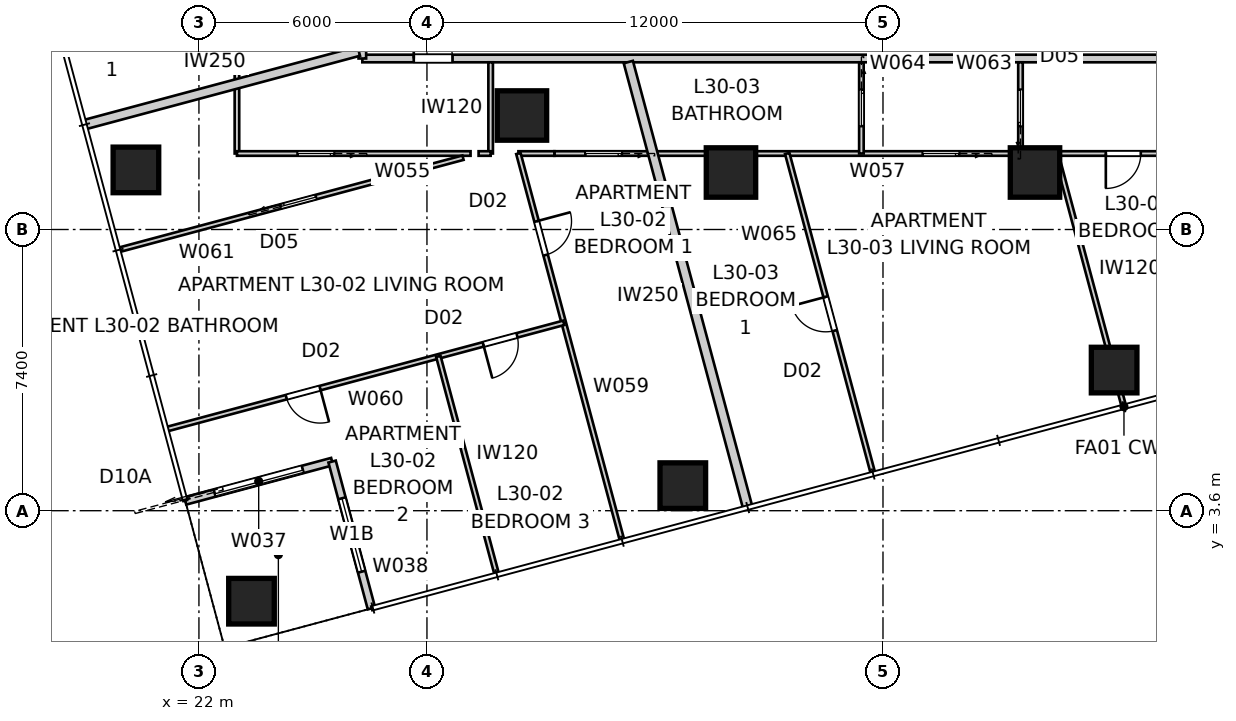
"""IFC4 building model, lengths in metres.
Left out: names, types, materials, properties, quantities, classifications, styles, units other than length and angle.
Written with IfcOpenShell. Run it as: python <this file> out.ifc"""

import sys

from ifc_helpers import new_model, si_unit, direction, frame, frame_2d, origin, origin_2d, place, context, subcontext, project, spatial, rectangle, extrude, element, fill, save


model = new_model("IFC4")
c1 = context("Model", 3, precision=1e-05, world=origin(), true_north=direction((0.0, 1.0)))
c2 = subcontext(c1, "Body", "Model", "MODEL_VIEW")
j1 = project(units=[si_unit("LENGTHUNIT", "METRE"), si_unit("PLANEANGLEUNIT", "RADIAN")], contexts=[c1])
p1 = place(None, origin())
s1 = spatial("IfcSite", under=j1, at=p1, CompositionType="ELEMENT")
p2 = place(p1, origin())
s2 = spatial("IfcBuilding", under=s1, at=p2, CompositionType="ELEMENT")
p3 = place(p2, frame((0.0, 0.0, 111.6)))
s3 = spatial("IfcBuildingStorey", under=s2, at=p3, CompositionType="ELEMENT", Elevation=111.6)
for number, where, z_axis, x_axis in (
    (1, (23.383, 1.219, -0.15), (0.0, 0.0, 1.0), (1.0, 0.0, 0.0)),
    (2, (34.733, 4.26, -0.15), (0.0, 0.0, 1.0), (1.0, 0.0, 0.0)),
    (3, (46.082, 7.301, -0.15), (0.0, 0.0, 1.0), (1.0, 0.0, 0.0)),
    (4, (20.342, 12.568, -0.15), (0.0, 0.0, 1.0), (1.0, 0.0, 0.0)),
):
    element("IfcColumn", number, at=place(p3, frame(where, z_axis=z_axis, x_axis=x_axis)), inside=s3, PredefinedType="COLUMN", context=c2, shape_type="SweptSolid", body=[
        extrude(rectangle(XDim=1.2, YDim=1.2, at=origin_2d()), origin(), (0.0, 0.0, 1.0), 3.55),
    ])
for number, where, z_axis, x_axis in (
    (5, (30.5, 14.0, 0.0), (0.0, 0.0, 1.0), (1.0, 0.0, 0.0)),
    (6, (36.0, 12.5, 0.0), (0.0, 0.0, 1.0), (1.0, 0.0, 0.0)),
    (7, (44.0, 12.5, 0.0), (0.0, 0.0, 1.0), (1.0, 0.0, 0.0)),
):
    element("IfcColumn", number, at=place(p3, frame(where, z_axis=z_axis, x_axis=x_axis)), inside=s3, PredefinedType="COLUMN", context=c2, shape_type="SweptSolid", body=[
        extrude(rectangle(XDim=1.3, YDim=1.3, at=origin_2d()), origin(), (0.0, 0.0, 1.0), 3.4),
    ])
p4 = place(p3, frame((21.641, 3.857, 0.0), z_axis=(0.0, 0.0, 1.0), x_axis=(0.965919172068, 0.258843877716, 0.0)))
e8 = element("IfcWall", 8, at=p4, inside=s3, PredefinedType="SOLIDWALL", context=c2, shape_type="SweptSolid", body=[
    extrude(rectangle(XDim=4.0, YDim=0.2, at=frame_2d((2.0, 0.0))), origin(), (0.0, 0.0, 1.0), 3.25),
])
p5 = place(p4, frame((0.8, 0.0, 0.0)))
e9 = element("IfcOpeningElement", 9, at=p5, cuts=e8, PredefinedType="OPENING", context=c2, shape_type="SweptSolid", body=[
    extrude(rectangle(XDim=2.4, YDim=2.1, at=frame_2d((1.2, 1.05))), frame((0.0, 0.11, 0.0), z_axis=(0.0, -1.0, 0.0), x_axis=(1.0, 0.0, 0.0)), (0.0, 0.0, 1.0), 0.22),
])
p6 = place(p3, frame((25.504, 4.893, 0.0), z_axis=(0.0, 0.0, 1.0), x_axis=(0.258786931944, -0.965934430412, 0.0)))
e10 = element("IfcWall", 10, at=p6, inside=s3, PredefinedType="SOLIDWALL", context=c2, shape_type="SweptSolid", body=[
    extrude(rectangle(XDim=4.0, YDim=0.2, at=frame_2d((2.0, 0.0))), origin(), (0.0, 0.0, 1.0), 3.25),
])
p7 = place(p6, frame((1.0, 0.0, 0.45)))
e11 = element("IfcOpeningElement", 11, at=p7, cuts=e10, PredefinedType="OPENING", context=c2, shape_type="SweptSolid", body=[
    extrude(rectangle(XDim=2.0, YDim=1.8, at=frame_2d((1.0, 0.9))), frame((0.0, 0.11, 0.0), z_axis=(0.0, -1.0, 0.0), x_axis=(1.0, 0.0, 0.0)), (0.0, 0.0, 1.0), 0.22),
])
p8 = place(p3, frame((26.3, 15.5, 0.0), z_axis=(0.0, 0.0, 1.0), x_axis=(1.0, 0.0, 0.0)))
e12 = element("IfcWall", 12, at=p8, inside=s3, PredefinedType="PARTITIONING", context=c2, shape_type="SweptSolid", body=[
    extrude(rectangle(XDim=28.2, YDim=0.2, at=frame_2d((14.1, 0.0))), origin(), (0.0, 0.0, 1.0), 3.25),
])
p9 = place(p8, frame((21.474, 0.0, 0.0)))
e13 = element("IfcOpeningElement", 13, at=p9, cuts=e12, PredefinedType="OPENING", context=c2, shape_type="SweptSolid", body=[
    extrude(rectangle(XDim=1.02, YDim=2.34, at=frame_2d((0.51, 1.17))), frame((0.0, 0.11, 0.0), z_axis=(0.0, -1.0, 0.0), x_axis=(1.0, 0.0, 0.0)), (0.0, 0.0, 1.0), 0.22),
])
p10 = place(p8, frame((1.353, 0.0, 0.0)))
e14 = element("IfcOpeningElement", 14, at=p10, cuts=e12, PredefinedType="OPENING", context=c2, shape_type="SweptSolid", body=[
    extrude(rectangle(XDim=1.02, YDim=2.1, at=frame_2d((0.51, 1.05))), frame((0.0, 0.11, 0.0), z_axis=(0.0, -1.0, 0.0), x_axis=(1.0, 0.0, 0.0)), (0.0, 0.0, 1.0), 0.22),
])
p11 = place(p3, frame((26.3, 42.52, 0.0), z_axis=(0.0, 0.0, 1.0), x_axis=(0.0, -1.0, 0.0)))
e15 = element("IfcWall", 15, at=p11, inside=s3, PredefinedType="PARTITIONING", context=c2, shape_type="SweptSolid", body=[
    extrude(rectangle(XDim=27.02, YDim=0.2, at=frame_2d((13.51, 0.0))), origin(), (0.0, 0.0, 1.0), 3.25),
])
p12 = place(p11, frame((23.584, 0.0, 0.0)))
e16 = element("IfcOpeningElement", 16, at=p12, cuts=e15, PredefinedType="OPENING", context=c2, shape_type="SweptSolid", body=[
    extrude(rectangle(XDim=1.02, YDim=2.1, at=frame_2d((0.51, 1.05))), frame((0.0, 0.11, 0.0), z_axis=(0.0, -1.0, 0.0), x_axis=(1.0, 0.0, 0.0)), (0.0, 0.0, 1.0), 0.22),
])
p13 = place(p11, frame((13.468, 0.0, 0.0)))
e17 = element("IfcOpeningElement", 17, at=p13, cuts=e15, PredefinedType="OPENING", context=c2, shape_type="SweptSolid", body=[
    extrude(rectangle(XDim=1.02, YDim=2.34, at=frame_2d((0.51, 1.17))), frame((0.0, 0.11, 0.0), z_axis=(0.0, -1.0, 0.0), x_axis=(1.0, 0.0, 0.0)), (0.0, 0.0, 1.0), 0.22),
])
p14 = place(p3, frame((36.44, 3.682, 0.0), z_axis=(0.0, 0.0, 1.0), x_axis=(-0.258824223352, 0.965924438766, 0.0)))
e18 = element("IfcWall", 18, at=p14, inside=s3, PredefinedType="PARTITIONING", context=c2, shape_type="SweptSolid", body=[
    extrude(rectangle(XDim=12.138, YDim=0.25, at=frame_2d((6.069, 0.0))), origin(), (0.0, 0.0, 1.0), 3.25),
])
p15 = place(p3, frame((18.988, 13.758, 0.0), z_axis=(0.0, 0.0, 1.0), x_axis=(0.965929532284, 0.258805213744, 0.0)))
e19 = element("IfcWall", 19, at=p15, inside=s3, PredefinedType="PARTITIONING", context=c2, shape_type="SweptSolid", body=[
    extrude(rectangle(XDim=7.473, YDim=0.25, at=frame_2d((3.737, 0.0))), origin(), (0.0, 0.0, 1.0), 3.25),
])
p16 = place(p3, frame((23.0, 13.0, 0.0), z_axis=(0.0, 0.0, 1.0), x_axis=(0.0, 1.0, 0.0)))
e20 = element("IfcWall", 20, at=p16, inside=s3, PredefinedType="PARTITIONING", context=c2, shape_type="SweptSolid", body=[
    extrude(rectangle(XDim=27.64, YDim=0.12, at=frame_2d((13.82, 0.0))), origin(), (0.0, 0.0, 1.0), 2.55),
])
p17 = place(p16, frame((3.192, 0.0, 0.0)))
e21 = element("IfcOpeningElement", 21, at=p17, cuts=e20, PredefinedType="OPENING", context=c2, shape_type="SweptSolid", body=[
    extrude(rectangle(XDim=0.92, YDim=2.34, at=frame_2d((0.46, 1.17))), frame((0.0, 0.07, 0.0), z_axis=(0.0, -1.0, 0.0), x_axis=(1.0, 0.0, 0.0)), (0.0, 0.0, 1.0), 0.14),
])
p18 = place(p16, frame((13.779, 0.0, 0.0)))
e22 = element("IfcOpeningElement", 22, at=p18, cuts=e20, PredefinedType="OPENING", context=c2, shape_type="SweptSolid", body=[
    extrude(rectangle(XDim=0.92, YDim=2.34, at=frame_2d((0.46, 1.17))), frame((0.0, 0.07, 0.0), z_axis=(0.0, -1.0, 0.0), x_axis=(1.0, 0.0, 0.0)), (0.0, 0.0, 1.0), 0.14),
])
p19 = place(p16, frame((16.374, 0.0, 0.0)))
e23 = element("IfcOpeningElement", 23, at=p19, cuts=e20, PredefinedType="OPENING", context=c2, shape_type="SweptSolid", body=[
    extrude(rectangle(XDim=0.92, YDim=2.34, at=frame_2d((0.46, 1.17))), frame((0.0, 0.07, 0.0), z_axis=(0.0, -1.0, 0.0), x_axis=(1.0, 0.0, 0.0)), (0.0, 0.0, 1.0), 0.14),
])
p20 = place(p16, frame((9.743, 0.0, 0.0)))
e24 = element("IfcOpeningElement", 24, at=p20, cuts=e20, PredefinedType="OPENING", context=c2, shape_type="SweptSolid", body=[
    extrude(rectangle(XDim=0.96, YDim=2.1, at=frame_2d((0.48, 1.05))), frame((0.0, 0.07, 0.0), z_axis=(0.0, -1.0, 0.0), x_axis=(1.0, 0.0, 0.0)), (0.0, 0.0, 1.0), 0.14),
])
p21 = place(p16, frame((24.879, 0.0, 0.0)))
e25 = element("IfcOpeningElement", 25, at=p21, cuts=e20, PredefinedType="OPENING", context=c2, shape_type="SweptSolid", body=[
    extrude(rectangle(XDim=0.96, YDim=2.1, at=frame_2d((0.48, 1.05))), frame((0.0, 0.07, 0.0), z_axis=(0.0, -1.0, 0.0), x_axis=(1.0, 0.0, 0.0)), (0.0, 0.0, 1.0), 0.14),
])
p22 = place(p3, frame((29.676, 15.4, 0.0), z_axis=(0.0, 0.0, 1.0), x_axis=(0.0, -1.0, 0.0)))
e26 = element("IfcWall", 26, at=p22, inside=s3, PredefinedType="PARTITIONING", context=c2, shape_type="SweptSolid", body=[
    extrude(rectangle(XDim=2.4, YDim=0.12, at=frame_2d((1.2, 0.0))), origin(), (0.0, 0.0, 1.0), 3.25),
])
p23 = place(p3, frame((29.147, 13.0, 0.0), z_axis=(0.0, 0.0, 1.0), x_axis=(-1.0, 0.0, 0.0)))
e27 = element("IfcWall", 27, at=p23, inside=s3, PredefinedType="PARTITIONING", context=c2, shape_type="SweptSolid", body=[
    extrude(rectangle(XDim=6.147, YDim=0.12, at=frame_2d((3.074, 0.0))), origin(), (0.0, 0.0, 1.0), 3.25),
])
p24 = place(p23, frame((3.591, 0.0, 0.0)))
e28 = element("IfcOpeningElement", 28, at=p24, cuts=e27, PredefinedType="OPENING", context=c2, shape_type="SweptSolid", body=[
    extrude(rectangle(XDim=0.96, YDim=2.1, at=frame_2d((0.48, 1.05))), frame((0.0, 0.07, 0.0), z_axis=(0.0, -1.0, 0.0), x_axis=(1.0, 0.0, 0.0)), (0.0, 0.0, 1.0), 0.14),
])
p25 = place(p3, frame((55.046, 13.0, 0.0), z_axis=(0.0, 0.0, 1.0), x_axis=(-1.0, 0.0, 0.0)))
e29 = element("IfcWall", 29, at=p25, inside=s3, PredefinedType="PARTITIONING", context=c2, shape_type="SweptSolid", body=[
    extrude(rectangle(XDim=23.693, YDim=0.12, at=frame_2d((11.846, 0.0))), origin(), (0.0, 0.0, 1.0), 2.55),
])
p26 = place(p25, frame((8.262, 0.0, 0.0)))
e30 = element("IfcOpeningElement", 30, at=p26, cuts=e29, PredefinedType="OPENING", context=c2, shape_type="SweptSolid", body=[
    extrude(rectangle(XDim=0.92, YDim=2.34, at=frame_2d((0.46, 1.17))), frame((0.0, 0.07, 0.0), z_axis=(0.0, -1.0, 0.0), x_axis=(1.0, 0.0, 0.0)), (0.0, 0.0, 1.0), 0.14),
])
p27 = place(p25, frame((3.825, 0.0, 0.0)))
e31 = element("IfcOpeningElement", 31, at=p27, cuts=e29, PredefinedType="OPENING", context=c2, shape_type="SweptSolid", body=[
    extrude(rectangle(XDim=0.92, YDim=2.34, at=frame_2d((0.46, 1.17))), frame((0.0, 0.07, 0.0), z_axis=(0.0, -1.0, 0.0), x_axis=(1.0, 0.0, 0.0)), (0.0, 0.0, 1.0), 0.14),
])
p28 = place(p25, frame((1.274, 0.0, 0.0)))
e32 = element("IfcOpeningElement", 32, at=p28, cuts=e29, PredefinedType="OPENING", context=c2, shape_type="SweptSolid", body=[
    extrude(rectangle(XDim=0.92, YDim=2.34, at=frame_2d((0.46, 1.17))), frame((0.0, 0.07, 0.0), z_axis=(0.0, -1.0, 0.0), x_axis=(1.0, 0.0, 0.0)), (0.0, 0.0, 1.0), 0.14),
])
p29 = place(p25, frame((13.041, 0.0, 0.0)))
e33 = element("IfcOpeningElement", 33, at=p29, cuts=e29, PredefinedType="OPENING", context=c2, shape_type="SweptSolid", body=[
    extrude(rectangle(XDim=0.96, YDim=2.1, at=frame_2d((0.48, 1.05))), frame((0.0, 0.07, 0.0), z_axis=(0.0, -1.0, 0.0), x_axis=(1.0, 0.0, 0.0)), (0.0, 0.0, 1.0), 0.14),
])
p30 = place(p25, frame((21.917, 0.0, 0.0)))
e34 = element("IfcOpeningElement", 34, at=p30, cuts=e29, PredefinedType="OPENING", context=c2, shape_type="SweptSolid", body=[
    extrude(rectangle(XDim=0.96, YDim=2.1, at=frame_2d((0.48, 1.05))), frame((0.0, 0.07, 0.0), z_axis=(0.0, -1.0, 0.0), x_axis=(1.0, 0.0, 0.0)), (0.0, 0.0, 1.0), 0.14),
])
p31 = place(p3, frame((30.406, 13.0, 0.0), z_axis=(0.0, 0.0, 1.0), x_axis=(0.258797552287, -0.965931585015, 0.0)))
e35 = element("IfcWall", 35, at=p31, inside=s3, PredefinedType="PARTITIONING", context=c2, shape_type="SweptSolid", body=[
    extrude(rectangle(XDim=10.522, YDim=0.12, at=frame_2d((5.261, 0.0))), origin(), (0.0, 0.0, 1.0), 2.722),
])
p32 = place(p31, frame((1.846, 0.0, 0.0)))
e36 = element("IfcOpeningElement", 36, at=p32, cuts=e35, PredefinedType="OPENING", context=c2, shape_type="SweptSolid", body=[
    extrude(rectangle(XDim=0.92, YDim=2.34, at=frame_2d((0.46, 1.17))), frame((0.0, 0.07, 0.0), z_axis=(0.0, -1.0, 0.0), x_axis=(1.0, 0.0, 0.0)), (0.0, 0.0, 1.0), 0.14),
])
p33 = place(p3, frame((31.6, 8.544, 0.0), z_axis=(0.0, 0.0, 1.0), x_axis=(-0.965927151587, -0.258814098973, 0.0)))
e37 = element("IfcWall", 37, at=p33, inside=s3, PredefinedType="PARTITIONING", context=c2, shape_type="SweptSolid", body=[
    extrude(rectangle(XDim=10.793, YDim=0.12, at=frame_2d((5.396, 0.0))), origin(), (0.0, 0.0, 1.0), 3.25),
])
p34 = place(p33, frame((6.64, 0.0, 0.0)))
e38 = element("IfcOpeningElement", 38, at=p34, cuts=e37, PredefinedType="OPENING", context=c2, shape_type="SweptSolid", body=[
    extrude(rectangle(XDim=0.92, YDim=2.34, at=frame_2d((0.46, 1.17))), frame((0.0, 0.07, 0.0), z_axis=(0.0, -1.0, 0.0), x_axis=(1.0, 0.0, 0.0)), (0.0, 0.0, 1.0), 0.14),
])
p35 = place(p33, frame((1.273, 0.0, 0.0)))
e39 = element("IfcOpeningElement", 39, at=p35, cuts=e37, PredefinedType="OPENING", context=c2, shape_type="SweptSolid", body=[
    extrude(rectangle(XDim=0.92, YDim=2.34, at=frame_2d((0.46, 1.17))), frame((0.0, 0.07, 0.0), z_axis=(0.0, -1.0, 0.0), x_axis=(1.0, 0.0, 0.0)), (0.0, 0.0, 1.0), 0.14),
])
p36 = place(p3, frame((19.911, 10.468, 0.0), z_axis=(0.0, 0.0, 1.0), x_axis=(0.965927203676, 0.25881390457, 0.0)))
e40 = element("IfcWall", 40, at=p36, inside=s3, PredefinedType="PARTITIONING", context=c2, shape_type="SweptSolid", body=[
    extrude(rectangle(XDim=9.357, YDim=0.12, at=frame_2d((4.678, 0.0))), origin(), (0.0, 0.0, 1.0), 2.638),
])
p37 = place(p36, frame((4.391, 0.0, 0.0)))
e41 = element("IfcOpeningElement", 41, at=p37, cuts=e40, PredefinedType="OPENING", context=c2, shape_type="SweptSolid", body=[
    extrude(rectangle(XDim=0.96, YDim=2.1, at=frame_2d((0.48, 1.05))), frame((0.0, 0.07, 0.0), z_axis=(0.0, -1.0, 0.0), x_axis=(1.0, 0.0, 0.0)), (0.0, 0.0, 1.0), 0.14),
])
p38 = place(p3, frame((28.3, 7.66, 0.0), z_axis=(0.0, 0.0, 1.0), x_axis=(0.25882212607, -0.965925000741, 0.0)))
e42 = element("IfcWall", 42, at=p38, inside=s3, PredefinedType="PARTITIONING", context=c2, shape_type="SweptSolid", body=[
    extrude(rectangle(XDim=5.91, YDim=0.12, at=frame_2d((2.955, 0.0))), origin(), (0.0, 0.0, 1.0), 3.25),
])
p39 = place(p3, frame((43.618, 13.0, 0.0), z_axis=(0.0, 0.0, 1.0), x_axis=(0.0, 1.0, 0.0)))
e43 = element("IfcWall", 43, at=p39, inside=s3, PredefinedType="PARTITIONING", context=c2, shape_type="SweptSolid", body=[
    extrude(rectangle(XDim=2.4, YDim=0.12, at=frame_2d((1.2, 0.0))), origin(), (0.0, 0.0, 1.0), 3.25),
])
p40 = place(p39, frame((0.72, 0.0, 0.0)))
e44 = element("IfcOpeningElement", 44, at=p40, cuts=e43, PredefinedType="OPENING", context=c2, shape_type="SweptSolid", body=[
    extrude(rectangle(XDim=0.96, YDim=2.1, at=frame_2d((0.48, 1.05))), frame((0.0, 0.07, 0.0), z_axis=(0.0, -1.0, 0.0), x_axis=(1.0, 0.0, 0.0)), (0.0, 0.0, 1.0), 0.14),
])
p41 = place(p3, frame((39.432, 15.4, 0.0), z_axis=(0.0, 0.0, 1.0), x_axis=(0.0, -1.0, 0.0)))
e45 = element("IfcWall", 45, at=p41, inside=s3, PredefinedType="PARTITIONING", context=c2, shape_type="SweptSolid", body=[
    extrude(rectangle(XDim=2.4, YDim=0.12, at=frame_2d((1.2, 0.0))), origin(), (0.0, 0.0, 1.0), 3.25),
])
p42 = place(p41, frame((0.72, 0.0, 0.0)))
e46 = element("IfcOpeningElement", 46, at=p42, cuts=e45, PredefinedType="OPENING", context=c2, shape_type="SweptSolid", body=[
    extrude(rectangle(XDim=0.96, YDim=2.1, at=frame_2d((0.48, 1.05))), frame((0.0, 0.07, 0.0), z_axis=(0.0, -1.0, 0.0), x_axis=(1.0, 0.0, 0.0)), (0.0, 0.0, 1.0), 0.14),
])
p43 = place(p3, frame((39.73, 4.605, 0.0), z_axis=(0.0, 0.0, 1.0), x_axis=(-0.258819860698, 0.965925607751, 0.0)))
e47 = element("IfcWall", 47, at=p43, inside=s3, PredefinedType="PARTITIONING", context=c2, shape_type="SweptSolid", body=[
    extrude(rectangle(XDim=8.691, YDim=0.12, at=frame_2d((4.346, 0.0))), origin(), (0.0, 0.0, 1.0), 3.25),
])
p44 = place(p43, frame((3.866, 0.0, 0.0)))
e48 = element("IfcOpeningElement", 48, at=p44, cuts=e47, PredefinedType="OPENING", context=c2, shape_type="SweptSolid", body=[
    extrude(rectangle(XDim=0.92, YDim=2.34, at=frame_2d((0.46, 1.17))), frame((0.0, 0.07, 0.0), z_axis=(0.0, -1.0, 0.0), x_axis=(1.0, 0.0, 0.0)), (0.0, 0.0, 1.0), 0.14),
])
p45 = place(p3, frame((44.555, 13.0, 0.0), z_axis=(0.0, 0.0, 1.0), x_axis=(0.258829770556, -0.965922952349, 0.0)))
e49 = element("IfcWall", 49, at=p45, inside=s3, PredefinedType="PARTITIONING", context=c2, shape_type="SweptSolid", body=[
    extrude(rectangle(XDim=6.86, YDim=0.12, at=frame_2d((3.43, 0.0))), origin(), (0.0, 0.0, 1.0), 3.25),
])
p46 = place(p3, frame((29.676, 13.0, 0.0), z_axis=(0.0, 0.0, 1.0), x_axis=(-1.0, 0.0, 0.0)))
e50 = element("IfcWall", 50, at=p46, inside=s3, PredefinedType="PARTITIONING", context=c2, shape_type="SweptSolid", body=[
    extrude(rectangle(XDim=0.317, YDim=0.12, at=frame_2d((0.158, 0.0))), origin(), (0.0, 0.0, 1.0), 3.25),
])
p47 = place(p3, frame((31.354, 13.0, 0.0), z_axis=(0.0, 0.0, 1.0), x_axis=(-1.0, 0.0, 0.0)))
e51 = element("IfcWall", 51, at=p47, inside=s3, PredefinedType="PARTITIONING", context=c2, shape_type="SweptSolid", body=[
    extrude(rectangle(XDim=0.947, YDim=0.12, at=frame_2d((0.474, 0.0))), origin(), (0.0, 0.0, 1.0), 3.25),
])
p48 = place(p5, origin())
e52 = element("IfcDoor", 52, at=p48, inside=s3, OperationType="SLIDING_TO_LEFT", PredefinedType="DOOR", context=c2, shape_type="SweptSolid", body=[
    extrude(rectangle(XDim=2.4, YDim=2.1, at=frame_2d((1.2, 1.05))), frame((0.0, 0.025, 0.0), z_axis=(0.0, -1.0, 0.0), x_axis=(1.0, 0.0, 0.0)), (0.0, 0.0, 1.0), 0.05),
])
fill(e9, e52)
p49 = place(p7, origin())
e53 = element("IfcWindow", 53, at=p49, inside=s3, PartitioningType="SINGLE_PANEL", PredefinedType="WINDOW", context=c2, shape_type="SweptSolid", body=[
    extrude(rectangle(XDim=2.0, YDim=1.8, at=frame_2d((1.0, 0.9))), frame((0.0, 0.03, 0.0), z_axis=(0.0, -1.0, 0.0), x_axis=(1.0, 0.0, 0.0)), (0.0, 0.0, 1.0), 0.06),
])
fill(e11, e53)
p50 = place(p10, origin())
e54 = element("IfcDoor", 54, at=p50, inside=s3, OperationType="SINGLE_SWING_LEFT", PredefinedType="DOOR", context=c2, shape_type="SweptSolid", body=[
    extrude(rectangle(XDim=1.02, YDim=2.1, at=frame_2d((0.51, 1.05))), frame((0.0, 0.025, 0.0), z_axis=(0.0, -1.0, 0.0), x_axis=(1.0, 0.0, 0.0)), (0.0, 0.0, 1.0), 0.05),
])
fill(e14, e54)
p51 = place(p26, origin())
e55 = element("IfcDoor", 55, at=p51, inside=s3, OperationType="SINGLE_SWING_RIGHT", PredefinedType="DOOR", context=c2, shape_type="SweptSolid", body=[
    extrude(rectangle(XDim=0.92, YDim=2.34, at=frame_2d((0.46, 1.17))), frame((0.0, 0.025, 0.0), z_axis=(0.0, -1.0, 0.0), x_axis=(1.0, 0.0, 0.0)), (0.0, 0.0, 1.0), 0.05),
])
fill(e30, e55)
p52 = place(p40, origin())
e56 = element("IfcDoor", 56, at=p52, inside=s3, OperationType="SLIDING_TO_LEFT", PredefinedType="DOOR", context=c2, shape_type="SweptSolid", body=[
    extrude(rectangle(XDim=0.96, YDim=2.1, at=frame_2d((0.48, 1.05))), frame((0.0, 0.025, 0.0), z_axis=(0.0, -1.0, 0.0), x_axis=(1.0, 0.0, 0.0)), (0.0, 0.0, 1.0), 0.05),
])
fill(e44, e56)
p53 = place(p24, origin())
e57 = element("IfcDoor", 57, at=p53, inside=s3, OperationType="SLIDING_TO_LEFT", PredefinedType="DOOR", context=c2, shape_type="SweptSolid", body=[
    extrude(rectangle(XDim=0.96, YDim=2.1, at=frame_2d((0.48, 1.05))), frame((0.0, 0.025, 0.0), z_axis=(0.0, -1.0, 0.0), x_axis=(1.0, 0.0, 0.0)), (0.0, 0.0, 1.0), 0.05),
])
fill(e28, e57)
p54 = place(p29, origin())
e58 = element("IfcDoor", 58, at=p54, inside=s3, OperationType="SLIDING_TO_LEFT", PredefinedType="DOOR", context=c2, shape_type="SweptSolid", body=[
    extrude(rectangle(XDim=0.96, YDim=2.1, at=frame_2d((0.48, 1.05))), frame((0.0, 0.025, 0.0), z_axis=(0.0, -1.0, 0.0), x_axis=(1.0, 0.0, 0.0)), (0.0, 0.0, 1.0), 0.05),
])
fill(e33, e58)
p55 = place(p42, origin())
e59 = element("IfcDoor", 59, at=p55, inside=s3, OperationType="SLIDING_TO_LEFT", PredefinedType="DOOR", context=c2, shape_type="SweptSolid", body=[
    extrude(rectangle(XDim=0.96, YDim=2.1, at=frame_2d((0.48, 1.05))), frame((0.0, 0.025, 0.0), z_axis=(0.0, -1.0, 0.0), x_axis=(1.0, 0.0, 0.0)), (0.0, 0.0, 1.0), 0.05),
])
fill(e46, e59)
p56 = place(p37, origin())
e60 = element("IfcDoor", 60, at=p56, inside=s3, OperationType="SLIDING_TO_LEFT", PredefinedType="DOOR", context=c2, shape_type="SweptSolid", body=[
    extrude(rectangle(XDim=0.96, YDim=2.1, at=frame_2d((0.48, 1.05))), frame((0.0, 0.025, 0.0), z_axis=(0.0, -1.0, 0.0), x_axis=(1.0, 0.0, 0.0)), (0.0, 0.0, 1.0), 0.05),
])
fill(e41, e60)
p57 = place(p44, origin())
e61 = element("IfcDoor", 61, at=p57, inside=s3, OperationType="SINGLE_SWING_RIGHT", PredefinedType="DOOR", context=c2, shape_type="SweptSolid", body=[
    extrude(rectangle(XDim=0.92, YDim=2.34, at=frame_2d((0.46, 1.17))), frame((0.0, 0.025, 0.0), z_axis=(0.0, -1.0, 0.0), x_axis=(1.0, 0.0, 0.0)), (0.0, 0.0, 1.0), 0.05),
])
fill(e48, e61)
p58 = place(p34, origin())
e62 = element("IfcDoor", 62, at=p58, inside=s3, OperationType="SINGLE_SWING_LEFT", PredefinedType="DOOR", context=c2, shape_type="SweptSolid", body=[
    extrude(rectangle(XDim=0.92, YDim=2.34, at=frame_2d((0.46, 1.17))), frame((0.0, 0.025, 0.0), z_axis=(0.0, -1.0, 0.0), x_axis=(1.0, 0.0, 0.0)), (0.0, 0.0, 1.0), 0.05),
])
fill(e38, e62)
p59 = place(p32, origin())
e63 = element("IfcDoor", 63, at=p59, inside=s3, OperationType="SINGLE_SWING_LEFT", PredefinedType="DOOR", context=c2, shape_type="SweptSolid", body=[
    extrude(rectangle(XDim=0.92, YDim=2.34, at=frame_2d((0.46, 1.17))), frame((0.0, 0.025, 0.0), z_axis=(0.0, -1.0, 0.0), x_axis=(1.0, 0.0, 0.0)), (0.0, 0.0, 1.0), 0.05),
])
fill(e36, e63)
p60 = place(p35, origin())
e64 = element("IfcDoor", 64, at=p60, inside=s3, OperationType="SINGLE_SWING_RIGHT", PredefinedType="DOOR", context=c2, shape_type="SweptSolid", body=[
    extrude(rectangle(XDim=0.92, YDim=2.34, at=frame_2d((0.46, 1.17))), frame((0.0, 0.025, 0.0), z_axis=(0.0, -1.0, 0.0), x_axis=(1.0, 0.0, 0.0)), (0.0, 0.0, 1.0), 0.05),
])
fill(e39, e64)
p61 = place(p30, origin())
e65 = element("IfcDoor", 65, at=p61, inside=s3, OperationType="SLIDING_TO_LEFT", PredefinedType="DOOR", context=c2, shape_type="SweptSolid", body=[
    extrude(rectangle(XDim=0.96, YDim=2.1, at=frame_2d((0.48, 1.05))), frame((0.0, 0.025, 0.0), z_axis=(0.0, -1.0, 0.0), x_axis=(1.0, 0.0, 0.0)), (0.0, 0.0, 1.0), 0.05),
])
fill(e34, e65)
save(model, sys.argv[1])
